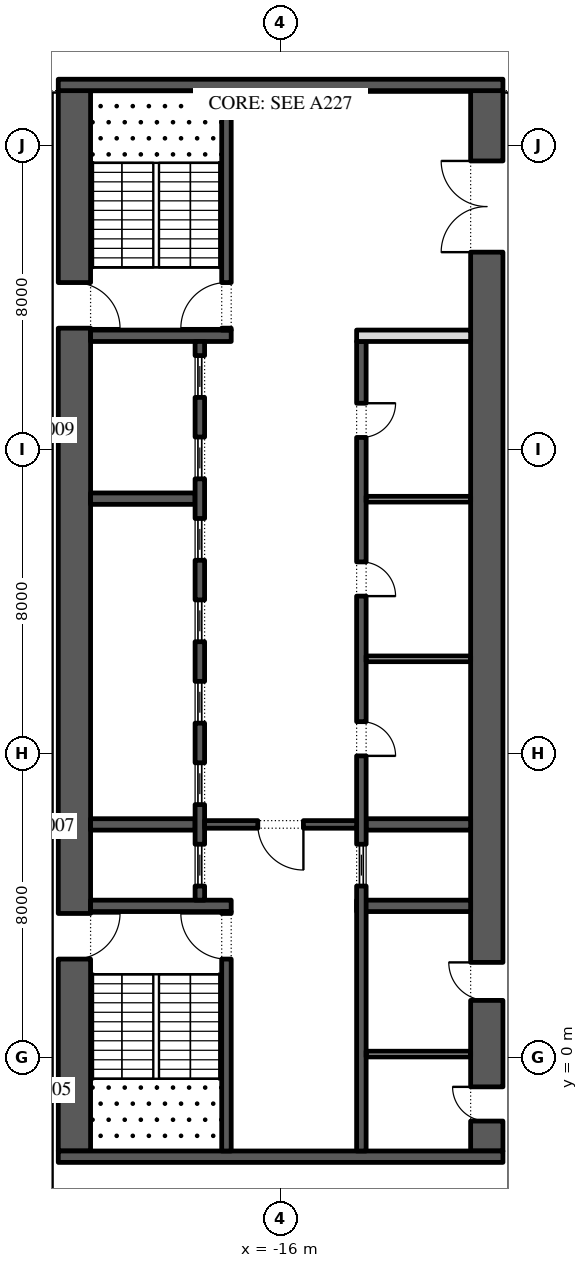
"""IFC4 building model, lengths in metres.
Left out: names, types, materials, properties, quantities, classifications, styles, units other than length and angle.
Written with IfcOpenShell. Run it as: python <this file> out.ifc"""

import sys

from ifc_helpers import new_model, si_unit, direction, frame, frame_2d, origin, place, context, subcontext, project, spatial, rectangle, extrude, element, fill, save


model = new_model("IFC4")
c1 = context("Model", 3, precision=1e-05, world=origin(), true_north=direction((0.0, 1.0)))
c2 = subcontext(c1, "Body", "Model", "MODEL_VIEW")
j1 = project(units=[si_unit("LENGTHUNIT", "METRE"), si_unit("PLANEANGLEUNIT", "RADIAN")], contexts=[c1])
p1 = place(None, origin())
s1 = spatial("IfcSite", under=j1, at=p1, CompositionType="ELEMENT")
p2 = place(p1, origin())
s2 = spatial("IfcBuilding", under=s1, at=p2, CompositionType="ELEMENT")
p3 = place(p2, frame((0.0, 0.0, 114.0)))
s3 = spatial("IfcBuildingStorey", under=s2, at=p3, CompositionType="ELEMENT", Elevation=114.0)
p4 = place(p3, frame((-21.425, -2.45, 0.0), z_axis=(0.0, 0.0, 1.0), x_axis=(0.0, 1.0, 0.0)))
e1 = element("IfcWall", 1, at=p4, inside=s3, PredefinedType="SHEAR", context=c2, shape_type="SweptSolid", body=[
    extrude(rectangle(XDim=27.9, YDim=0.85, at=frame_2d((13.95, 0.0))), origin(), (0.0, 0.0, 1.0), 4.0),
])
p5 = place(p4, frame((5.05, 0.0, 0.0)))
e2 = element("IfcOpeningElement", 2, at=p5, cuts=e1, PredefinedType="OPENING", context=c2, shape_type="SweptSolid", body=[
    extrude(rectangle(XDim=1.2, YDim=2.1, at=frame_2d((0.6, 1.05))), frame((0.0, 0.435, 0.0), z_axis=(0.0, -1.0, 0.0), x_axis=(1.0, 0.0, 0.0)), (0.0, 0.0, 1.0), 0.87),
])
p6 = place(p4, frame((21.65, 0.0, 0.0)))
e3 = element("IfcOpeningElement", 3, at=p6, cuts=e1, PredefinedType="OPENING", context=c2, shape_type="SweptSolid", body=[
    extrude(rectangle(XDim=1.2, YDim=2.1, at=frame_2d((0.6, 1.05))), frame((0.0, 0.435, 0.0), z_axis=(0.0, -1.0, 0.0), x_axis=(1.0, 0.0, 0.0)), (0.0, 0.0, 1.0), 0.87),
])
p7 = place(p3, frame((-10.575, -2.45, 0.0), z_axis=(0.0, 0.0, 1.0), x_axis=(0.0, 1.0, 0.0)))
e4 = element("IfcWall", 4, at=p7, inside=s3, PredefinedType="SHEAR", context=c2, shape_type="SweptSolid", body=[
    extrude(rectangle(XDim=27.9, YDim=0.85, at=frame_2d((13.95, 0.0))), origin(), (0.0, 0.0, 1.0), 4.0),
])
p8 = place(p7, frame((23.65, 0.0, 0.0)))
e5 = element("IfcOpeningElement", 5, at=p8, cuts=e4, PredefinedType="OPENING", context=c2, shape_type="SweptSolid", body=[
    extrude(rectangle(XDim=2.4, YDim=2.1, at=frame_2d((1.2, 1.05))), frame((0.0, 0.435, 0.0), z_axis=(0.0, -1.0, 0.0), x_axis=(1.0, 0.0, 0.0)), (0.0, 0.0, 1.0), 0.87),
])
p9 = place(p7, frame((0.788, 0.0, 0.0)))
e6 = element("IfcOpeningElement", 6, at=p9, cuts=e4, PredefinedType="OPENING", context=c2, shape_type="SweptSolid", body=[
    extrude(rectangle(XDim=0.9, YDim=2.1, at=frame_2d((0.45, 1.05))), frame((0.0, 0.435, 0.0), z_axis=(0.0, -1.0, 0.0), x_axis=(1.0, 0.0, 0.0)), (0.0, 0.0, 1.0), 0.87),
])
p10 = place(p7, frame((3.962, 0.0, 0.0)))
e7 = element("IfcOpeningElement", 7, at=p10, cuts=e4, PredefinedType="OPENING", context=c2, shape_type="SweptSolid", body=[
    extrude(rectangle(XDim=1.0, YDim=2.1, at=frame_2d((0.5, 1.05))), frame((0.0, 0.435, 0.0), z_axis=(0.0, -1.0, 0.0), x_axis=(1.0, 0.0, 0.0)), (0.0, 0.0, 1.0), 0.87),
])
for number, where, z_axis, x_axis in (
    (8, (-21.85, -2.6, 0.0), (0.0, 0.0, 1.0), (1.0, 0.0, 0.0)),
    (9, (-21.85, 25.6, 0.0), (0.0, 0.0, 1.0), (1.0, 0.0, 0.0)),
):
    element("IfcWall", number, at=place(p3, frame(where, z_axis=z_axis, x_axis=x_axis)), inside=s3, PredefinedType="SHEAR", context=c2, shape_type="SweptSolid", body=[
        extrude(rectangle(XDim=11.7, YDim=0.3, at=frame_2d((5.85, 0.0))), origin(), (0.0, 0.0, 1.0), 4.0),
    ])
p11 = place(p3, frame((-21.0, 4.0, 0.0), z_axis=(0.0, 0.0, 1.0), x_axis=(1.0, 0.0, 0.0)))
e10 = element("IfcWall", 10, at=p11, inside=s3, PredefinedType="SHEAR", context=c2, shape_type="SweptSolid", body=[
    extrude(rectangle(XDim=3.7, YDim=0.3, at=frame_2d((1.85, 0.0))), origin(), (0.0, 0.0, 1.0), 4.0),
])
p12 = place(p3, frame((-17.425, -2.45, 0.0), z_axis=(0.0, 0.0, 1.0), x_axis=(0.0, 1.0, 0.0)))
e11 = element("IfcWall", 11, at=p12, inside=s3, PredefinedType="SHEAR", context=c2, shape_type="SweptSolid", body=[
    extrude(rectangle(XDim=6.3, YDim=0.25, at=frame_2d((3.15, 0.0))), origin(), (0.0, 0.0, 1.0), 4.0),
])
p13 = place(p12, frame((5.05, 0.0, 0.0)))
e12 = element("IfcOpeningElement", 12, at=p13, cuts=e11, PredefinedType="OPENING", context=c2, shape_type="SweptSolid", body=[
    extrude(rectangle(XDim=1.2, YDim=2.1, at=frame_2d((0.6, 1.05))), frame((0.0, 0.135, 0.0), z_axis=(0.0, -1.0, 0.0), x_axis=(1.0, 0.0, 0.0)), (0.0, 0.0, 1.0), 0.27),
])
p14 = place(p3, frame((-21.0, 19.0, 0.0), z_axis=(0.0, 0.0, 1.0), x_axis=(1.0, 0.0, 0.0)))
e13 = element("IfcWall", 13, at=p14, inside=s3, PredefinedType="SHEAR", context=c2, shape_type="SweptSolid", body=[
    extrude(rectangle(XDim=3.7, YDim=0.3, at=frame_2d((1.85, 0.0))), origin(), (0.0, 0.0, 1.0), 4.0),
])
p15 = place(p3, frame((-17.425, 19.15, 0.0), z_axis=(0.0, 0.0, 1.0), x_axis=(0.0, 1.0, 0.0)))
e14 = element("IfcWall", 14, at=p15, inside=s3, PredefinedType="SHEAR", context=c2, shape_type="SweptSolid", body=[
    extrude(rectangle(XDim=6.3, YDim=0.25, at=frame_2d((3.15, 0.0))), origin(), (0.0, 0.0, 1.0), 4.0),
])
p16 = place(p15, frame((0.05, 0.0, 0.0)))
e15 = element("IfcOpeningElement", 15, at=p16, cuts=e14, PredefinedType="OPENING", context=c2, shape_type="SweptSolid", body=[
    extrude(rectangle(XDim=1.2, YDim=2.1, at=frame_2d((0.6, 1.05))), frame((0.0, 0.135, 0.0), z_axis=(0.0, -1.0, 0.0), x_axis=(1.0, 0.0, 0.0)), (0.0, 0.0, 1.0), 0.27),
])
for number, where, z_axis, x_axis in (
    (16, (-21.0, 6.143, 0.0), (0.0, 0.0, 1.0), (1.0, 0.0, 0.0)),
    (17, (-21.0, 14.714, 0.0), (0.0, 0.0, 1.0), (1.0, 0.0, 0.0)),
):
    element("IfcWall", number, at=place(p3, frame(where, z_axis=z_axis, x_axis=x_axis)), inside=s3, PredefinedType="SHEAR", context=c2, shape_type="SweptSolid", body=[
        extrude(rectangle(XDim=2.75, YDim=0.3, at=frame_2d((1.375, 0.0))), origin(), (0.0, 0.0, 1.0), 4.0),
    ])
p17 = place(p3, frame((-18.125, 4.15, 0.0), z_axis=(0.0, 0.0, 1.0), x_axis=(0.0, 1.0, 0.0)))
e18 = element("IfcWall", 18, at=p17, inside=s3, PredefinedType="SHEAR", context=c2, shape_type="SweptSolid", body=[
    extrude(rectangle(XDim=14.7, YDim=0.25, at=frame_2d((7.35, 0.0))), origin(), (0.0, 0.0, 1.0), 4.0),
])
p18 = place(p17, frame((0.371, 0.0, 0.0)))
e19 = element("IfcOpeningElement", 19, at=p18, cuts=e18, PredefinedType="OPENING", context=c2, shape_type="SweptSolid", body=[
    extrude(rectangle(XDim=1.1, YDim=2.1, at=frame_2d((0.55, 1.05))), frame((0.0, 0.135, 0.0), z_axis=(0.0, -1.0, 0.0), x_axis=(1.0, 0.0, 0.0)), (0.0, 0.0, 1.0), 0.27),
])
p19 = place(p17, frame((2.514, 0.0, 0.0)))
e20 = element("IfcOpeningElement", 20, at=p19, cuts=e18, PredefinedType="OPENING", context=c2, shape_type="SweptSolid", body=[
    extrude(rectangle(XDim=1.1, YDim=2.1, at=frame_2d((0.55, 1.05))), frame((0.0, 0.135, 0.0), z_axis=(0.0, -1.0, 0.0), x_axis=(1.0, 0.0, 0.0)), (0.0, 0.0, 1.0), 0.27),
])
p20 = place(p17, frame((4.657, 0.0, 0.0)))
e21 = element("IfcOpeningElement", 21, at=p20, cuts=e18, PredefinedType="OPENING", context=c2, shape_type="SweptSolid", body=[
    extrude(rectangle(XDim=1.1, YDim=2.1, at=frame_2d((0.55, 1.05))), frame((0.0, 0.135, 0.0), z_axis=(0.0, -1.0, 0.0), x_axis=(1.0, 0.0, 0.0)), (0.0, 0.0, 1.0), 0.27),
])
p21 = place(p17, frame((6.8, 0.0, 0.0)))
e22 = element("IfcOpeningElement", 22, at=p21, cuts=e18, PredefinedType="OPENING", context=c2, shape_type="SweptSolid", body=[
    extrude(rectangle(XDim=1.1, YDim=2.1, at=frame_2d((0.55, 1.05))), frame((0.0, 0.135, 0.0), z_axis=(0.0, -1.0, 0.0), x_axis=(1.0, 0.0, 0.0)), (0.0, 0.0, 1.0), 0.27),
])
p22 = place(p17, frame((8.943, 0.0, 0.0)))
e23 = element("IfcOpeningElement", 23, at=p22, cuts=e18, PredefinedType="OPENING", context=c2, shape_type="SweptSolid", body=[
    extrude(rectangle(XDim=1.1, YDim=2.1, at=frame_2d((0.55, 1.05))), frame((0.0, 0.135, 0.0), z_axis=(0.0, -1.0, 0.0), x_axis=(1.0, 0.0, 0.0)), (0.0, 0.0, 1.0), 0.27),
])
p23 = place(p17, frame((11.086, 0.0, 0.0)))
e24 = element("IfcOpeningElement", 24, at=p23, cuts=e18, PredefinedType="OPENING", context=c2, shape_type="SweptSolid", body=[
    extrude(rectangle(XDim=1.1, YDim=2.1, at=frame_2d((0.55, 1.05))), frame((0.0, 0.135, 0.0), z_axis=(0.0, -1.0, 0.0), x_axis=(1.0, 0.0, 0.0)), (0.0, 0.0, 1.0), 0.27),
])
p24 = place(p17, frame((13.229, 0.0, 0.0)))
e25 = element("IfcOpeningElement", 25, at=p24, cuts=e18, PredefinedType="OPENING", context=c2, shape_type="SweptSolid", body=[
    extrude(rectangle(XDim=1.1, YDim=2.1, at=frame_2d((0.55, 1.05))), frame((0.0, 0.135, 0.0), z_axis=(0.0, -1.0, 0.0), x_axis=(1.0, 0.0, 0.0)), (0.0, 0.0, 1.0), 0.27),
])
p25 = place(p3, frame((-14.0, 4.0, 0.0), z_axis=(0.0, 0.0, 1.0), x_axis=(1.0, 0.0, 0.0)))
e26 = element("IfcWall", 26, at=p25, inside=s3, PredefinedType="SHEAR", context=c2, shape_type="SweptSolid", body=[
    extrude(rectangle(XDim=3.0, YDim=0.3, at=frame_2d((1.5, 0.0))), origin(), (0.0, 0.0, 1.0), 4.0),
])
p26 = place(p3, frame((-13.75, 6.143, 0.0), z_axis=(0.0, 0.0, 1.0), x_axis=(1.0, 0.0, 0.0)))
e27 = element("IfcWall", 27, at=p26, inside=s3, PredefinedType="SHEAR", context=c2, shape_type="SweptSolid", body=[
    extrude(rectangle(XDim=2.75, YDim=0.3, at=frame_2d((1.375, 0.0))), origin(), (0.0, 0.0, 1.0), 4.0),
])
p27 = place(p3, frame((-13.875, -2.45, 0.0), z_axis=(0.0, 0.0, 1.0), x_axis=(0.0, 1.0, 0.0)))
e28 = element("IfcWall", 28, at=p27, inside=s3, PredefinedType="SHEAR", context=c2, shape_type="SweptSolid", body=[
    extrude(rectangle(XDim=21.3, YDim=0.25, at=frame_2d((10.65, 0.0))), origin(), (0.0, 0.0, 1.0), 4.0),
])
p28 = place(p27, frame((10.396, 0.0, 0.0)))
e29 = element("IfcOpeningElement", 29, at=p28, cuts=e28, PredefinedType="OPENING", context=c2, shape_type="SweptSolid", body=[
    extrude(rectangle(XDim=0.9, YDim=2.1, at=frame_2d((0.45, 1.05))), frame((0.0, 0.135, 0.0), z_axis=(0.0, -1.0, 0.0), x_axis=(1.0, 0.0, 0.0)), (0.0, 0.0, 1.0), 0.27),
])
p29 = place(p27, frame((14.6, 0.0, 0.0)))
e30 = element("IfcOpeningElement", 30, at=p29, cuts=e28, PredefinedType="OPENING", context=c2, shape_type="SweptSolid", body=[
    extrude(rectangle(XDim=0.9, YDim=2.1, at=frame_2d((0.45, 1.05))), frame((0.0, 0.135, 0.0), z_axis=(0.0, -1.0, 0.0), x_axis=(1.0, 0.0, 0.0)), (0.0, 0.0, 1.0), 0.27),
])
p30 = place(p27, frame((18.775, 0.0, 0.0)))
e31 = element("IfcOpeningElement", 31, at=p30, cuts=e28, PredefinedType="OPENING", context=c2, shape_type="SweptSolid", body=[
    extrude(rectangle(XDim=0.9, YDim=2.1, at=frame_2d((0.45, 1.05))), frame((0.0, 0.135, 0.0), z_axis=(0.0, -1.0, 0.0), x_axis=(1.0, 0.0, 0.0)), (0.0, 0.0, 1.0), 0.27),
])
p31 = place(p27, frame((6.971, 0.0, 0.0)))
e32 = element("IfcOpeningElement", 32, at=p31, cuts=e28, PredefinedType="OPENING", context=c2, shape_type="SweptSolid", body=[
    extrude(rectangle(XDim=1.1, YDim=2.1, at=frame_2d((0.55, 1.05))), frame((0.0, 0.135, 0.0), z_axis=(0.0, -1.0, 0.0), x_axis=(1.0, 0.0, 0.0)), (0.0, 0.0, 1.0), 0.27),
])
p32 = place(p3, frame((-14.0, 19.0, 0.0), z_axis=(0.0, 0.0, 1.0), x_axis=(1.0, 0.0, 0.0)))
e33 = element("IfcWall", 33, at=p32, inside=s3, PredefinedType="PARTITIONING", context=c2, shape_type="SweptSolid", body=[
    extrude(rectangle(XDim=3.0, YDim=0.3, at=frame_2d((1.5, 0.0))), origin(), (0.0, 0.0, 1.0), 4.0),
])
for number, where, z_axis, x_axis in (
    (34, (-13.75, 10.5, 0.0), (0.0, 0.0, 1.0), (1.0, 0.0, 0.0)),
    (35, (-13.75, 14.7, 0.0), (0.0, 0.0, 1.0), (1.0, 0.0, 0.0)),
):
    element("IfcWall", number, at=place(p3, frame(where, z_axis=z_axis, x_axis=x_axis)), inside=s3, PredefinedType="PARTITIONING", context=c2, shape_type="SweptSolid", body=[
        extrude(rectangle(XDim=2.75, YDim=0.15, at=frame_2d((1.375, 0.0))), origin(), (0.0, 0.0, 1.0), 4.0),
    ])
p33 = place(p3, frame((-18.0, 6.143, 0.0), z_axis=(0.0, 0.0, 1.0), x_axis=(1.0, 0.0, 0.0)))
e36 = element("IfcWall", 36, at=p33, inside=s3, PredefinedType="SHEAR", context=c2, shape_type="SweptSolid", body=[
    extrude(rectangle(XDim=4.0, YDim=0.2, at=frame_2d((2.0, 0.0))), origin(), (0.0, 0.0, 1.0), 4.0),
])
p34 = place(p33, frame((1.4, 0.0, 0.0)))
e37 = element("IfcOpeningElement", 37, at=p34, cuts=e36, PredefinedType="OPENING", context=c2, shape_type="SweptSolid", body=[
    extrude(rectangle(XDim=1.2, YDim=2.1, at=frame_2d((0.6, 1.05))), frame((0.0, 0.11, 0.0), z_axis=(0.0, -1.0, 0.0), x_axis=(1.0, 0.0, 0.0)), (0.0, 0.0, 1.0), 0.22),
])
p35 = place(p3, frame((-13.75, 0.1, 0.0), z_axis=(0.0, 0.0, 1.0), x_axis=(1.0, 0.0, 0.0)))
e38 = element("IfcWall", 38, at=p35, inside=s3, PredefinedType="PARTITIONING", context=c2, shape_type="SweptSolid", body=[
    extrude(rectangle(XDim=2.75, YDim=0.15, at=frame_2d((1.375, 0.0))), origin(), (0.0, 0.0, 1.0), 4.0),
])
p36 = place(p18, origin())
e39 = element("IfcDoor", 39, at=p36, inside=s3, OperationType="SLIDING_TO_LEFT", PredefinedType="DOOR", context=c2, shape_type="SweptSolid", body=[
    extrude(rectangle(XDim=1.1, YDim=2.1, at=frame_2d((0.55, 1.05))), frame((0.0, 0.025, 0.0), z_axis=(0.0, -1.0, 0.0), x_axis=(1.0, 0.0, 0.0)), (0.0, 0.0, 1.0), 0.05),
])
fill(e19, e39)
p37 = place(p19, origin())
e40 = element("IfcDoor", 40, at=p37, inside=s3, OperationType="SLIDING_TO_LEFT", PredefinedType="DOOR", context=c2, shape_type="SweptSolid", body=[
    extrude(rectangle(XDim=1.1, YDim=2.1, at=frame_2d((0.55, 1.05))), frame((0.0, 0.025, 0.0), z_axis=(0.0, -1.0, 0.0), x_axis=(1.0, 0.0, 0.0)), (0.0, 0.0, 1.0), 0.05),
])
fill(e20, e40)
p38 = place(p20, origin())
e41 = element("IfcDoor", 41, at=p38, inside=s3, OperationType="SLIDING_TO_LEFT", PredefinedType="DOOR", context=c2, shape_type="SweptSolid", body=[
    extrude(rectangle(XDim=1.1, YDim=2.1, at=frame_2d((0.55, 1.05))), frame((0.0, 0.025, 0.0), z_axis=(0.0, -1.0, 0.0), x_axis=(1.0, 0.0, 0.0)), (0.0, 0.0, 1.0), 0.05),
])
fill(e21, e41)
p39 = place(p21, origin())
e42 = element("IfcDoor", 42, at=p39, inside=s3, OperationType="SLIDING_TO_LEFT", PredefinedType="DOOR", context=c2, shape_type="SweptSolid", body=[
    extrude(rectangle(XDim=1.1, YDim=2.1, at=frame_2d((0.55, 1.05))), frame((0.0, 0.025, 0.0), z_axis=(0.0, -1.0, 0.0), x_axis=(1.0, 0.0, 0.0)), (0.0, 0.0, 1.0), 0.05),
])
fill(e22, e42)
p40 = place(p22, origin())
e43 = element("IfcDoor", 43, at=p40, inside=s3, OperationType="SLIDING_TO_LEFT", PredefinedType="DOOR", context=c2, shape_type="SweptSolid", body=[
    extrude(rectangle(XDim=1.1, YDim=2.1, at=frame_2d((0.55, 1.05))), frame((0.0, 0.025, 0.0), z_axis=(0.0, -1.0, 0.0), x_axis=(1.0, 0.0, 0.0)), (0.0, 0.0, 1.0), 0.05),
])
fill(e23, e43)
p41 = place(p23, origin())
e44 = element("IfcDoor", 44, at=p41, inside=s3, OperationType="SLIDING_TO_LEFT", PredefinedType="DOOR", context=c2, shape_type="SweptSolid", body=[
    extrude(rectangle(XDim=1.1, YDim=2.1, at=frame_2d((0.55, 1.05))), frame((0.0, 0.025, 0.0), z_axis=(0.0, -1.0, 0.0), x_axis=(1.0, 0.0, 0.0)), (0.0, 0.0, 1.0), 0.05),
])
fill(e24, e44)
p42 = place(p24, origin())
e45 = element("IfcDoor", 45, at=p42, inside=s3, OperationType="SLIDING_TO_LEFT", PredefinedType="DOOR", context=c2, shape_type="SweptSolid", body=[
    extrude(rectangle(XDim=1.1, YDim=2.1, at=frame_2d((0.55, 1.05))), frame((0.0, 0.025, 0.0), z_axis=(0.0, -1.0, 0.0), x_axis=(1.0, 0.0, 0.0)), (0.0, 0.0, 1.0), 0.05),
])
fill(e25, e45)
p43 = place(p28, frame((0.9, -0.2, 0.0), z_axis=(0.0, 0.0, 1.0), x_axis=(-1.0, 0.0, 0.0)))
e46 = element("IfcDoor", 46, at=p43, inside=s3, OperationType="SINGLE_SWING_LEFT", PredefinedType="DOOR", context=c2, shape_type="SweptSolid", body=[
    extrude(rectangle(XDim=0.9, YDim=2.1, at=frame_2d((0.45, 1.05))), frame((0.0, -0.075, 0.0), z_axis=(0.0, -1.0, 0.0), x_axis=(1.0, 0.0, 0.0)), (0.0, 0.0, 1.0), 0.05),
])
fill(e29, e46)
p44 = place(p29, frame((0.9, -0.2, 0.0), z_axis=(0.0, 0.0, 1.0), x_axis=(-1.0, 0.0, 0.0)))
e47 = element("IfcDoor", 47, at=p44, inside=s3, OperationType="SINGLE_SWING_LEFT", PredefinedType="DOOR", context=c2, shape_type="SweptSolid", body=[
    extrude(rectangle(XDim=0.9, YDim=2.1, at=frame_2d((0.45, 1.05))), frame((0.0, -0.075, 0.0), z_axis=(0.0, -1.0, 0.0), x_axis=(1.0, 0.0, 0.0)), (0.0, 0.0, 1.0), 0.05),
])
fill(e30, e47)
p45 = place(p30, frame((0.9, -0.2, 0.0), z_axis=(0.0, 0.0, 1.0), x_axis=(-1.0, 0.0, 0.0)))
e48 = element("IfcDoor", 48, at=p45, inside=s3, OperationType="SINGLE_SWING_RIGHT", PredefinedType="DOOR", context=c2, shape_type="SweptSolid", body=[
    extrude(rectangle(XDim=0.9, YDim=2.1, at=frame_2d((0.45, 1.05))), frame((0.0, -0.075, 0.0), z_axis=(0.0, -1.0, 0.0), x_axis=(1.0, 0.0, 0.0)), (0.0, 0.0, 1.0), 0.05),
])
fill(e31, e48)
p46 = place(p31, origin())
e49 = element("IfcDoor", 49, at=p46, inside=s3, OperationType="SLIDING_TO_LEFT", PredefinedType="DOOR", context=c2, shape_type="SweptSolid", body=[
    extrude(rectangle(XDim=1.1, YDim=2.1, at=frame_2d((0.55, 1.05))), frame((0.0, 0.025, 0.0), z_axis=(0.0, -1.0, 0.0), x_axis=(1.0, 0.0, 0.0)), (0.0, 0.0, 1.0), 0.05),
])
fill(e32, e49)
p47 = place(p34, frame((1.2, 0.0, 0.0), z_axis=(0.0, 0.0, 1.0), x_axis=(-1.0, 0.0, 0.0)))
e50 = element("IfcDoor", 50, at=p47, inside=s3, OperationType="SINGLE_SWING_RIGHT", PredefinedType="DOOR", context=c2, shape_type="SweptSolid", body=[
    extrude(rectangle(XDim=1.2, YDim=2.1, at=frame_2d((0.6, 1.05))), frame((0.0, 0.025, 0.0), z_axis=(0.0, -1.0, 0.0), x_axis=(1.0, 0.0, 0.0)), (0.0, 0.0, 1.0), 0.05),
])
fill(e37, e50)
p48 = place(p8, origin())
e51 = element("IfcDoor", 51, at=p48, inside=s3, OperationType="DOUBLE_DOOR_SINGLE_SWING", PredefinedType="DOOR", context=c2, shape_type="SweptSolid", body=[
    extrude(rectangle(XDim=2.4, YDim=2.1, at=frame_2d((1.2, 1.05))), frame((0.0, 0.025, 0.0), z_axis=(0.0, -1.0, 0.0), x_axis=(1.0, 0.0, 0.0)), (0.0, 0.0, 1.0), 0.05),
])
fill(e5, e51)
p49 = place(p13, origin())
e52 = element("IfcDoor", 52, at=p49, inside=s3, OperationType="SINGLE_SWING_LEFT", PredefinedType="DOOR", context=c2, shape_type="SweptSolid", body=[
    extrude(rectangle(XDim=1.2, YDim=2.1, at=frame_2d((0.6, 1.05))), frame((0.0, 0.025, 0.0), z_axis=(0.0, -1.0, 0.0), x_axis=(1.0, 0.0, 0.0)), (0.0, 0.0, 1.0), 0.05),
])
fill(e12, e52)
p50 = place(p5, frame((1.2, 0.0, 0.0), z_axis=(0.0, 0.0, 1.0), x_axis=(-1.0, 0.0, 0.0)))
e53 = element("IfcDoor", 53, at=p50, inside=s3, OperationType="SINGLE_SWING_RIGHT", PredefinedType="DOOR", context=c2, shape_type="SweptSolid", body=[
    extrude(rectangle(XDim=1.2, YDim=2.1, at=frame_2d((0.6, 1.05))), frame((0.0, 0.025, 0.0), z_axis=(0.0, -1.0, 0.0), x_axis=(1.0, 0.0, 0.0)), (0.0, 0.0, 1.0), 0.05),
])
fill(e2, e53)
p51 = place(p16, origin())
e54 = element("IfcDoor", 54, at=p51, inside=s3, OperationType="SINGLE_SWING_RIGHT", PredefinedType="DOOR", context=c2, shape_type="SweptSolid", body=[
    extrude(rectangle(XDim=1.2, YDim=2.1, at=frame_2d((0.6, 1.05))), frame((0.0, 0.025, 0.0), z_axis=(0.0, -1.0, 0.0), x_axis=(1.0, 0.0, 0.0)), (0.0, 0.0, 1.0), 0.05),
])
fill(e15, e54)
p52 = place(p6, frame((1.2, 0.0, 0.0), z_axis=(0.0, 0.0, 1.0), x_axis=(-1.0, 0.0, 0.0)))
e55 = element("IfcDoor", 55, at=p52, inside=s3, OperationType="SINGLE_SWING_LEFT", PredefinedType="DOOR", context=c2, shape_type="SweptSolid", body=[
    extrude(rectangle(XDim=1.2, YDim=2.1, at=frame_2d((0.6, 1.05))), frame((0.0, 0.025, 0.0), z_axis=(0.0, -1.0, 0.0), x_axis=(1.0, 0.0, 0.0)), (0.0, 0.0, 1.0), 0.05),
])
fill(e3, e55)
p53 = place(p9, origin())
e56 = element("IfcDoor", 56, at=p53, inside=s3, OperationType="SINGLE_SWING_LEFT", PredefinedType="DOOR", context=c2, shape_type="SweptSolid", body=[
    extrude(rectangle(XDim=0.9, YDim=2.1, at=frame_2d((0.45, 1.05))), frame((0.0, 0.425, 0.0), z_axis=(0.0, -1.0, 0.0), x_axis=(1.0, 0.0, 0.0)), (0.0, 0.0, 1.0), 0.05),
])
fill(e6, e56)
p54 = place(p10, origin())
e57 = element("IfcDoor", 57, at=p54, inside=s3, OperationType="SINGLE_SWING_LEFT", PredefinedType="DOOR", context=c2, shape_type="SweptSolid", body=[
    extrude(rectangle(XDim=1.0, YDim=2.1, at=frame_2d((0.5, 1.05))), frame((0.0, 0.425, 0.0), z_axis=(0.0, -1.0, 0.0), x_axis=(1.0, 0.0, 0.0)), (0.0, 0.0, 1.0), 0.05),
])
fill(e7, e57)
save(model, sys.argv[1])
